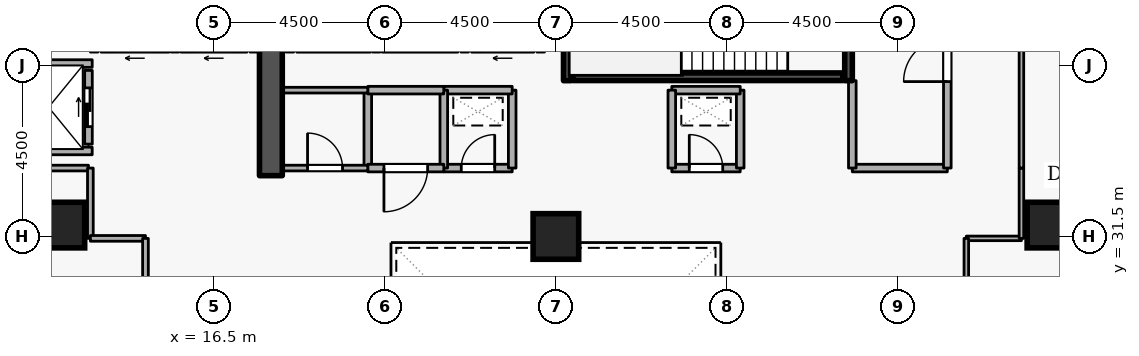
"""IFC4 building model, lengths in metres.
Left out: names, types, materials, properties, quantities, classifications, styles, units other than length and angle.
Written with IfcOpenShell. Run it as: python <this file> out.ifc"""

import sys

from ifc_helpers import new_model, si_unit, direction, frame, frame_2d, origin, origin_2d, place, context, subcontext, project, spatial, rectangle, extrude, element, fill, save


model = new_model("IFC4")
c1 = context("Model", 3, precision=1e-05, world=origin(), true_north=direction((0.0, 1.0)))
c2 = subcontext(c1, "Body", "Model", "MODEL_VIEW")
j1 = project(units=[si_unit("LENGTHUNIT", "METRE"), si_unit("PLANEANGLEUNIT", "RADIAN")], contexts=[c1])
p1 = place(None, origin())
s1 = spatial("IfcSite", under=j1, at=p1, CompositionType="ELEMENT")
p2 = place(p1, origin())
s2 = spatial("IfcBuilding", under=s1, at=p2, CompositionType="ELEMENT")
p3 = place(p2, frame((0.0, 0.0, 98.1)))
s3 = spatial("IfcBuildingStorey", under=s2, at=p3, CompositionType="ELEMENT", Elevation=98.1)
p4 = place(p3, frame((18.0, 33.1, 0.0), z_axis=(0.0, 0.0, 1.0), x_axis=(0.0, 1.0, 0.0)))
e1 = element("IfcWall", 1, at=p4, inside=s3, PredefinedType="SHEAR", context=c2, shape_type="SweptSolid", body=[
    extrude(rectangle(XDim=5.7, YDim=0.6, at=frame_2d((2.85, 0.0))), origin(), (0.0, 0.0, 1.0), 3.6),
])
for number, where, z_axis, x_axis in (
    (2, (12.5, 31.8, 0.0), (0.0, 0.0, 1.0), (1.0, 0.0, 0.0)),
    (3, (38.5, 31.8, 0.0), (0.0, 0.0, 1.0), (1.0, 0.0, 0.0)),
    (4, (25.5, 31.5, 0.0), (0.0, 0.0, 1.0), (1.0, 0.0, 0.0)),
):
    element("IfcColumn", number, at=place(p3, frame(where, z_axis=z_axis, x_axis=x_axis)), inside=s3, PredefinedType="COLUMN", context=c2, shape_type="SweptSolid", body=[
        extrude(rectangle(XDim=1.2, YDim=1.2, at=origin_2d()), origin(), (0.0, 0.0, 1.0), 3.6),
    ])
p5 = place(p3, frame((24.92, 36.45, 0.0), z_axis=(0.0, 0.0, 1.0), x_axis=(-1.0, 0.0, 0.0)))
e5 = element("IfcWall", 5, at=p5, inside=s3, PredefinedType="STANDARD", context=c2, shape_type="SweptSolid", body=[
    extrude(rectangle(XDim=1.64, YDim=0.2, at=frame_2d((0.82, 0.0))), origin(), (0.0, 0.0, 1.0), 3.3),
])
p6 = place(p5, frame((0.31, 0.0, 0.0)))
e6 = element("IfcOpeningElement", 6, at=p6, cuts=e5, PredefinedType="OPENING", context=c2, shape_type="SweptSolid", body=[
    extrude(rectangle(XDim=1.02, YDim=2.06, at=frame_2d((0.51, 1.03))), frame((0.0, 0.11, 0.0), z_axis=(0.0, -1.0, 0.0), x_axis=(1.0, 0.0, 0.0)), (0.0, 0.0, 1.0), 0.22),
])
p7 = place(p3, frame((22.92, 36.45, 0.0), z_axis=(0.0, 0.0, 1.0), x_axis=(-1.0, 0.0, 0.0)))
e7 = element("IfcWall", 7, at=p7, inside=s3, PredefinedType="STANDARD", context=c2, shape_type="SweptSolid", body=[
    extrude(rectangle(XDim=1.99, YDim=0.2, at=frame_2d((0.995, 0.0))), origin(), (0.0, 0.0, 1.0), 3.3),
])
p8 = place(p3, frame((20.62, 36.45, 0.0), z_axis=(0.0, 0.0, 1.0), x_axis=(-1.0, 0.0, 0.0)))
e8 = element("IfcWall", 8, at=p8, inside=s3, PredefinedType="STANDARD", context=c2, shape_type="SweptSolid", body=[
    extrude(rectangle(XDim=1.94, YDim=0.2, at=frame_2d((0.97, 0.0))), origin(), (0.0, 0.0, 1.0), 3.3),
])
p9 = place(p3, frame((17.37, 36.45, 0.0), z_axis=(0.0, 0.0, 1.0), x_axis=(-1.0, 0.0, 0.0)))
e9 = element("IfcWall", 9, at=p9, inside=s3, PredefinedType="STANDARD", context=c2, shape_type="SweptSolid", body=[
    extrude(rectangle(XDim=1.74, YDim=0.2, at=frame_2d((0.87, 0.0))), origin(), (0.0, 0.0, 1.0), 3.3),
])
p10 = place(p9, frame((0.36, 0.0, 0.0)))
e10 = element("IfcOpeningElement", 10, at=p10, cuts=e9, PredefinedType="OPENING", context=c2, shape_type="SweptSolid", body=[
    extrude(rectangle(XDim=1.02, YDim=2.06, at=frame_2d((0.51, 1.03))), frame((0.0, 0.11, 0.0), z_axis=(0.0, -1.0, 0.0), x_axis=(1.0, 0.0, 0.0)), (0.0, 0.0, 1.0), 0.22),
])
p11 = place(p3, frame((15.32, 36.45, 0.0), z_axis=(0.0, 0.0, 1.0), x_axis=(-1.0, 0.0, 0.0)))
e11 = element("IfcWall", 11, at=p11, inside=s3, PredefinedType="STANDARD", context=c2, shape_type="SweptSolid", body=[
    extrude(rectangle(XDim=1.79, YDim=0.2, at=frame_2d((0.895, 0.0))), origin(), (0.0, 0.0, 1.0), 3.3),
])
p12 = place(p11, frame((0.385, 0.0, 0.0)))
e12 = element("IfcOpeningElement", 12, at=p12, cuts=e11, PredefinedType="OPENING", context=c2, shape_type="SweptSolid", body=[
    extrude(rectangle(XDim=1.02, YDim=2.06, at=frame_2d((0.51, 1.03))), frame((0.0, 0.11, 0.0), z_axis=(0.0, -1.0, 0.0), x_axis=(1.0, 0.0, 0.0)), (0.0, 0.0, 1.0), 0.22),
])
p13 = place(p3, frame((13.2, 33.93, 0.0), z_axis=(0.0, 0.0, 1.0), x_axis=(0.0, 1.0, 0.0)))
e13 = element("IfcWall", 13, at=p13, inside=s3, PredefinedType="STANDARD", context=c2, shape_type="SweptSolid", body=[
    extrude(rectangle(XDim=1.94, YDim=0.2, at=frame_2d((0.97, 0.0))), origin(), (0.0, 0.0, 1.0), 3.3),
])
p14 = place(p13, frame((0.46, 0.0, 0.0)))
e14 = element("IfcOpeningElement", 14, at=p14, cuts=e13, PredefinedType="OPENING", context=c2, shape_type="SweptSolid", body=[
    extrude(rectangle(XDim=1.02, YDim=2.06, at=frame_2d((0.51, 1.03))), frame((0.0, 0.11, 0.0), z_axis=(0.0, -1.0, 0.0), x_axis=(1.0, 0.0, 0.0)), (0.0, 0.0, 1.0), 0.22),
])
for number, where, z_axis, x_axis in (
    (15, (11.002, 36.05, 0.0), (0.0, 0.0, 1.0), (1.0, 0.0, 0.0)),
    (16, (11.002, 33.75, 0.0), (0.0, 0.0, 1.0), (1.0, 0.0, 0.0)),
):
    element("IfcWall", number, at=place(p3, frame(where, z_axis=z_axis, x_axis=x_axis)), inside=s3, PredefinedType="STANDARD", context=c2, shape_type="SweptSolid", body=[
        extrude(rectangle(XDim=2.296, YDim=0.2, at=frame_2d((1.148, 0.0))), origin(), (0.0, 0.0, 1.0), 3.3),
    ])
p15 = place(p3, frame((33.2, 38.95, 0.0), z_axis=(0.0, 0.0, 1.0), x_axis=(0.0, -1.0, 0.0)))
e17 = element("IfcWall", 17, at=p15, inside=s3, PredefinedType="SHEAR", context=c2, shape_type="SweptSolid", body=[
    extrude(rectangle(XDim=3.35, YDim=0.2, at=frame_2d((1.675, 0.0))), origin(), (0.0, 0.0, 1.0), 3.6),
])
p16 = place(p15, frame((1.125, 0.0, 0.0)))
e18 = element("IfcOpeningElement", 18, at=p16, cuts=e17, PredefinedType="OPENING", context=c2, shape_type="SweptSolid", body=[
    extrude(rectangle(XDim=1.1, YDim=2.1, at=frame_2d((0.55, 1.05))), frame((0.0, 0.11, 0.0), z_axis=(0.0, -1.0, 0.0), x_axis=(1.0, 0.0, 0.0)), (0.0, 0.0, 1.0), 0.22),
])
p17 = place(p3, frame((25.8, 35.6, 0.0), z_axis=(0.0, 0.0, 1.0), x_axis=(0.0, 1.0, 0.0)))
e19 = element("IfcWall", 19, at=p17, inside=s3, PredefinedType="SHEAR", context=c2, shape_type="SweptSolid", body=[
    extrude(rectangle(XDim=3.35, YDim=0.2, at=frame_2d((1.675, 0.0))), origin(), (0.0, 0.0, 1.0), 3.6),
])
p18 = place(p3, frame((25.95, 35.703, 0.0), z_axis=(0.0, 0.0, 1.0), x_axis=(1.0, 0.0, 0.0)))
e20 = element("IfcWall", 20, at=p18, inside=s3, PredefinedType="SHEAR", context=c2, shape_type="SweptSolid", body=[
    extrude(rectangle(XDim=7.1, YDim=0.2, at=frame_2d((3.55, 0.0))), origin(), (0.0, 0.0, 1.0), 3.6),
])
p19 = place(p3, frame((33.3, 33.3, 0.0), z_axis=(0.0, 0.0, 1.0), x_axis=(1.0, 0.0, 0.0)))
e21 = element("IfcWall", 21, at=p19, inside=s3, PredefinedType="STANDARD", context=c2, shape_type="SweptSolid", body=[
    extrude(rectangle(XDim=2.5, YDim=0.2, at=frame_2d((1.25, 0.0))), origin(), (0.0, 0.0, 1.0), 3.3),
])
p20 = place(p3, frame((35.8, 33.3, 0.0), z_axis=(0.0, 0.0, 1.0), x_axis=(0.0, 1.0, 0.0)))
e22 = element("IfcWall", 22, at=p20, inside=s3, PredefinedType="STANDARD", context=c2, shape_type="SweptSolid", body=[
    extrude(rectangle(XDim=5.7, YDim=0.2, at=frame_2d((2.85, 0.0))), origin(), (0.0, 0.0, 1.0), 3.3),
])
p21 = place(p20, frame((2.275, 0.0, 0.0)))
e23 = element("IfcOpeningElement", 23, at=p21, cuts=e22, PredefinedType="OPENING", context=c2, shape_type="SweptSolid", body=[
    extrude(rectangle(XDim=1.15, YDim=2.1, at=frame_2d((0.575, 1.05))), frame((0.0, 0.11, 0.0), z_axis=(0.0, -1.0, 0.0), x_axis=(1.0, 0.0, 0.0)), (0.0, 0.0, 1.0), 0.22),
])
p22 = place(p3, frame((33.3, 35.6, 0.0), z_axis=(0.0, 0.0, 1.0), x_axis=(0.0, -1.0, 0.0)))
e24 = element("IfcWall", 24, at=p22, inside=s3, PredefinedType="STANDARD", context=c2, shape_type="SweptSolid", body=[
    extrude(rectangle(XDim=2.3, YDim=0.2, at=frame_2d((1.15, 0.0))), origin(), (0.0, 0.0, 1.0), 2.505),
])
p23 = place(p3, frame((22.55, 33.3, 0.0), z_axis=(0.0, 0.0, 1.0), x_axis=(1.0, 0.0, 0.0)))
e25 = element("IfcWall", 25, at=p23, inside=s3, PredefinedType="STANDARD", context=c2, shape_type="SweptSolid", body=[
    extrude(rectangle(XDim=1.8, YDim=0.2, at=frame_2d((0.9, 0.0))), origin(), (0.0, 0.0, 1.0), 3.3),
])
p24 = place(p23, frame((0.46, 0.0, 0.0)))
e26 = element("IfcOpeningElement", 26, at=p24, cuts=e25, PredefinedType="OPENING", context=c2, shape_type="SweptSolid", body=[
    extrude(rectangle(XDim=0.88, YDim=2.04, at=frame_2d((0.44, 1.02))), frame((0.0, 0.11, 0.0), z_axis=(0.0, -1.0, 0.0), x_axis=(1.0, 0.0, 0.0)), (0.0, 0.0, 1.0), 0.22),
])
p25 = place(p3, frame((24.35, 33.3, 0.0), z_axis=(0.0, 0.0, 1.0), x_axis=(0.0, 1.0, 0.0)))
e27 = element("IfcWall", 27, at=p25, inside=s3, PredefinedType="STANDARD", context=c2, shape_type="SweptSolid", body=[
    extrude(rectangle(XDim=2.05, YDim=0.2, at=frame_2d((1.025, 0.0))), origin(), (0.0, 0.0, 1.0), 3.3),
])
p26 = place(p3, frame((24.35, 35.35, 0.0), z_axis=(0.0, 0.0, 1.0), x_axis=(-1.0, 0.0, 0.0)))
e28 = element("IfcWall", 28, at=p26, inside=s3, PredefinedType="STANDARD", context=c2, shape_type="SweptSolid", body=[
    extrude(rectangle(XDim=1.8, YDim=0.2, at=frame_2d((0.9, 0.0))), origin(), (0.0, 0.0, 1.0), 3.3),
])
p27 = place(p3, frame((22.55, 35.35, 0.0), z_axis=(0.0, 0.0, 1.0), x_axis=(0.0, -1.0, 0.0)))
e29 = element("IfcWall", 29, at=p27, inside=s3, PredefinedType="STANDARD", context=c2, shape_type="SweptSolid", body=[
    extrude(rectangle(XDim=2.05, YDim=0.2, at=frame_2d((1.025, 0.0))), origin(), (0.0, 0.0, 1.0), 3.3),
])
p28 = place(p3, frame((28.55, 33.3, 0.0), z_axis=(0.0, 0.0, 1.0), x_axis=(1.0, 0.0, 0.0)))
e30 = element("IfcWall", 30, at=p28, inside=s3, PredefinedType="STANDARD", context=c2, shape_type="SweptSolid", body=[
    extrude(rectangle(XDim=1.8, YDim=0.2, at=frame_2d((0.9, 0.0))), origin(), (0.0, 0.0, 1.0), 3.3),
])
p29 = place(p28, frame((0.46, 0.0, 0.0)))
e31 = element("IfcOpeningElement", 31, at=p29, cuts=e30, PredefinedType="OPENING", context=c2, shape_type="SweptSolid", body=[
    extrude(rectangle(XDim=0.88, YDim=2.04, at=frame_2d((0.44, 1.02))), frame((0.0, 0.11, 0.0), z_axis=(0.0, -1.0, 0.0), x_axis=(1.0, 0.0, 0.0)), (0.0, 0.0, 1.0), 0.22),
])
p30 = place(p3, frame((30.35, 33.3, 0.0), z_axis=(0.0, 0.0, 1.0), x_axis=(0.0, 1.0, 0.0)))
e32 = element("IfcWall", 32, at=p30, inside=s3, PredefinedType="STANDARD", context=c2, shape_type="SweptSolid", body=[
    extrude(rectangle(XDim=2.05, YDim=0.2, at=frame_2d((1.025, 0.0))), origin(), (0.0, 0.0, 1.0), 3.3),
])
p31 = place(p3, frame((30.35, 35.35, 0.0), z_axis=(0.0, 0.0, 1.0), x_axis=(-1.0, 0.0, 0.0)))
e33 = element("IfcWall", 33, at=p31, inside=s3, PredefinedType="STANDARD", context=c2, shape_type="SweptSolid", body=[
    extrude(rectangle(XDim=1.8, YDim=0.2, at=frame_2d((0.9, 0.0))), origin(), (0.0, 0.0, 1.0), 3.3),
])
for number, where, z_axis, x_axis in (
    (34, (28.55, 35.35, 0.0), (0.0, 0.0, 1.0), (0.0, -1.0, 0.0)),
    (35, (20.55, 33.3, 0.0), (0.0, 0.0, 1.0), (0.0, 1.0, 0.0)),
):
    element("IfcWall", number, at=place(p3, frame(where, z_axis=z_axis, x_axis=x_axis)), inside=s3, PredefinedType="STANDARD", context=c2, shape_type="SweptSolid", body=[
        extrude(rectangle(XDim=2.05, YDim=0.2, at=frame_2d((1.025, 0.0))), origin(), (0.0, 0.0, 1.0), 3.3),
    ])
p32 = place(p3, frame((20.55, 35.35, 0.0), z_axis=(0.0, 0.0, 1.0), x_axis=(1.0, 0.0, 0.0)))
e36 = element("IfcWall", 36, at=p32, inside=s3, PredefinedType="STANDARD", context=c2, shape_type="SweptSolid", body=[
    extrude(rectangle(XDim=2.0, YDim=0.2, at=frame_2d((1.0, 0.0))), origin(), (0.0, 0.0, 1.0), 3.3),
])
p33 = place(p3, frame((22.55, 33.3, 0.0), z_axis=(0.0, 0.0, 1.0), x_axis=(-1.0, 0.0, 0.0)))
e37 = element("IfcWall", 37, at=p33, inside=s3, PredefinedType="STANDARD", context=c2, shape_type="SweptSolid", body=[
    extrude(rectangle(XDim=2.0, YDim=0.2, at=frame_2d((1.0, 0.0))), origin(), (0.0, 0.0, 1.0), 3.3),
])
p34 = place(p33, frame((0.425, 0.0, 0.0)))
e38 = element("IfcOpeningElement", 38, at=p34, cuts=e37, PredefinedType="OPENING", context=c2, shape_type="SweptSolid", body=[
    extrude(rectangle(XDim=1.15, YDim=2.1, at=frame_2d((0.575, 1.05))), frame((0.0, 0.11, 0.0), z_axis=(0.0, -1.0, 0.0), x_axis=(1.0, 0.0, 0.0)), (0.0, 0.0, 1.0), 0.22),
])
p35 = place(p3, frame((18.3, 33.3, 0.0), z_axis=(0.0, 0.0, 1.0), x_axis=(1.0, 0.0, 0.0)))
e39 = element("IfcWall", 39, at=p35, inside=s3, PredefinedType="PARTITIONING", context=c2, shape_type="SweptSolid", body=[
    extrude(rectangle(XDim=2.25, YDim=0.15, at=frame_2d((1.125, 0.0))), origin(), (0.0, 0.0, 1.0), 3.3),
])
p36 = place(p35, frame((0.665, 0.0, 0.0)))
e40 = element("IfcOpeningElement", 40, at=p36, cuts=e39, PredefinedType="OPENING", context=c2, shape_type="SweptSolid", body=[
    extrude(rectangle(XDim=0.92, YDim=2.08, at=frame_2d((0.46, 1.04))), frame((0.0, 0.085, 0.0), z_axis=(0.0, -1.0, 0.0), x_axis=(1.0, 0.0, 0.0)), (0.0, 0.0, 1.0), 0.17),
])
p37 = place(p3, frame((20.55, 35.35, 0.0), z_axis=(0.0, 0.0, 1.0), x_axis=(-1.0, 0.0, 0.0)))
e41 = element("IfcWall", 41, at=p37, inside=s3, PredefinedType="PARTITIONING", context=c2, shape_type="SweptSolid", body=[
    extrude(rectangle(XDim=2.25, YDim=0.15, at=frame_2d((1.125, 0.0))), origin(), (0.0, 0.0, 1.0), 3.3),
])
p38 = place(p3, frame((10.9, 33.3, 0.0), z_axis=(0.0, 0.0, 1.0), x_axis=(1.0, 0.0, 0.0)))
e42 = element("IfcWall", 42, at=p38, inside=s3, PredefinedType="PARTITIONING", context=c2, shape_type="SweptSolid", body=[
    extrude(rectangle(XDim=2.3, YDim=0.15, at=frame_2d((1.15, 0.0))), origin(), (0.0, 0.0, 1.0), 3.3),
])
p39 = place(p3, frame((13.25, 33.3, 0.0), z_axis=(0.0, 0.0, 1.0), x_axis=(0.0, -1.0, 0.0)))
e43 = element("IfcWall", 43, at=p39, inside=s3, PredefinedType="PARTITIONING", context=c2, shape_type="SweptSolid", body=[
    extrude(rectangle(XDim=1.85, YDim=0.15, at=frame_2d((0.925, 0.0))), origin(), (0.0, 0.0, 1.0), 3.3),
])
p40 = place(p3, frame((13.25, 31.45, 0.0), z_axis=(0.0, 0.0, 1.0), x_axis=(1.0, 0.0, 0.0)))
e44 = element("IfcWall", 44, at=p40, inside=s3, PredefinedType="PARTITIONING", context=c2, shape_type="SweptSolid", body=[
    extrude(rectangle(XDim=1.45, YDim=0.15, at=frame_2d((0.725, 0.0))), origin(), (0.0, 0.0, 1.0), 3.3),
])
p41 = place(p3, frame((14.7, 31.45, 0.0), z_axis=(0.0, 0.0, 1.0), x_axis=(0.0, -1.0, 0.0)))
e45 = element("IfcWall", 45, at=p41, inside=s3, PredefinedType="PARTITIONING", context=c2, shape_type="SweptSolid", body=[
    extrude(rectangle(XDim=4.45, YDim=0.15, at=frame_2d((2.225, 0.0))), origin(), (0.0, 0.0, 1.0), 3.3),
])
p42 = place(p41, frame((1.575, 0.0, 0.0)))
e46 = element("IfcOpeningElement", 46, at=p42, cuts=e45, PredefinedType="OPENING", context=c2, shape_type="SweptSolid", body=[
    extrude(rectangle(XDim=1.3, YDim=2.12, at=frame_2d((0.65, 1.06))), frame((0.0, 0.085, 0.0), z_axis=(0.0, -1.0, 0.0), x_axis=(1.0, 0.0, 0.0)), (0.0, 0.0, 1.0), 0.17),
])
p43 = place(p3, frame((36.3, 31.45, 0.0), z_axis=(0.0, 0.0, 1.0), x_axis=(1.0, 0.0, 0.0)))
e47 = element("IfcWall", 47, at=p43, inside=s3, PredefinedType="PARTITIONING", context=c2, shape_type="SweptSolid", body=[
    extrude(rectangle(XDim=1.45, YDim=0.12, at=frame_2d((0.725, 0.0))), origin(), (0.0, 0.0, 1.0), 3.3),
])
p44 = place(p3, frame((37.75, 31.45, 0.0), z_axis=(0.0, 0.0, 1.0), x_axis=(0.0, 1.0, 0.0)))
e48 = element("IfcWall", 48, at=p44, inside=s3, PredefinedType="PARTITIONING", context=c2, shape_type="SweptSolid", body=[
    extrude(rectangle(XDim=1.85, YDim=0.12, at=frame_2d((0.925, 0.0))), origin(), (0.0, 0.0, 1.0), 3.3),
])
p45 = place(p3, frame((37.75, 33.3, 0.0), z_axis=(0.0, 0.0, 1.0), x_axis=(0.0, 1.0, 0.0)))
e49 = element("IfcWall", 49, at=p45, inside=s3, PredefinedType="PARTITIONING", context=c2, shape_type="SweptSolid", body=[
    extrude(rectangle(XDim=9.35, YDim=0.12, at=frame_2d((4.675, 0.0))), origin(), (0.0, 0.0, 1.0), 3.3),
])
p46 = place(p45, frame((4.15, 0.0, 0.0)))
e50 = element("IfcOpeningElement", 50, at=p46, cuts=e49, PredefinedType="OPENING", context=c2, shape_type="SweptSolid", body=[
    extrude(rectangle(XDim=1.05, YDim=2.1, at=frame_2d((0.525, 1.05))), frame((0.0, 0.07, 0.0), z_axis=(0.0, -1.0, 0.0), x_axis=(1.0, 0.0, 0.0)), (0.0, 0.0, 1.0), 0.14),
])
p47 = place(p3, frame((36.3, 27.0, 0.0), z_axis=(0.0, 0.0, 1.0), x_axis=(0.0, 1.0, 0.0)))
e51 = element("IfcWall", 51, at=p47, inside=s3, PredefinedType="PARTITIONING", context=c2, shape_type="SweptSolid", body=[
    extrude(rectangle(XDim=4.45, YDim=0.12, at=frame_2d((2.225, 0.0))), origin(), (0.0, 0.0, 1.0), 3.3),
])
p48 = place(p14, origin())
e52 = element("IfcDoor", 52, at=p48, inside=s3, OperationType="SLIDING_TO_LEFT", PredefinedType="DOOR", context=c2, shape_type="SweptSolid", body=[
    extrude(rectangle(XDim=1.02, YDim=2.06, at=frame_2d((0.51, 1.03))), frame((0.0, 0.025, 0.0), z_axis=(0.0, -1.0, 0.0), x_axis=(1.0, 0.0, 0.0)), (0.0, 0.0, 1.0), 0.05),
])
fill(e14, e52)
p49 = place(p21, origin())
e53 = element("IfcDoor", 53, at=p49, inside=s3, OperationType="SINGLE_SWING_LEFT", PredefinedType="DOOR", context=c2, shape_type="SweptSolid", body=[
    extrude(rectangle(XDim=1.15, YDim=2.1, at=frame_2d((0.575, 1.05))), frame((0.0, 0.025, 0.0), z_axis=(0.0, -1.0, 0.0), x_axis=(1.0, 0.0, 0.0)), (0.0, 0.0, 1.0), 0.05),
])
fill(e23, e53)
p50 = place(p24, origin())
e54 = element("IfcDoor", 54, at=p50, inside=s3, OperationType="SINGLE_SWING_RIGHT", PredefinedType="DOOR", context=c2, shape_type="SweptSolid", body=[
    extrude(rectangle(XDim=0.88, YDim=2.04, at=frame_2d((0.44, 1.02))), frame((0.0, 0.025, 0.0), z_axis=(0.0, -1.0, 0.0), x_axis=(1.0, 0.0, 0.0)), (0.0, 0.0, 1.0), 0.05),
])
fill(e26, e54)
p51 = place(p29, origin())
e55 = element("IfcDoor", 55, at=p51, inside=s3, OperationType="SINGLE_SWING_LEFT", PredefinedType="DOOR", context=c2, shape_type="SweptSolid", body=[
    extrude(rectangle(XDim=0.88, YDim=2.04, at=frame_2d((0.44, 1.02))), frame((0.0, 0.025, 0.0), z_axis=(0.0, -1.0, 0.0), x_axis=(1.0, 0.0, 0.0)), (0.0, 0.0, 1.0), 0.05),
])
fill(e31, e55)
p52 = place(p36, origin())
e56 = element("IfcDoor", 56, at=p52, inside=s3, OperationType="SINGLE_SWING_LEFT", PredefinedType="DOOR", context=c2, shape_type="SweptSolid", body=[
    extrude(rectangle(XDim=0.92, YDim=2.08, at=frame_2d((0.46, 1.04))), frame((0.0, 0.025, 0.0), z_axis=(0.0, -1.0, 0.0), x_axis=(1.0, 0.0, 0.0)), (0.0, 0.0, 1.0), 0.05),
])
fill(e40, e56)
p53 = place(p34, origin())
e57 = element("IfcDoor", 57, at=p53, inside=s3, OperationType="SINGLE_SWING_RIGHT", PredefinedType="DOOR", context=c2, shape_type="SweptSolid", body=[
    extrude(rectangle(XDim=1.15, YDim=2.1, at=frame_2d((0.575, 1.05))), frame((0.0, 0.025, 0.0), z_axis=(0.0, -1.0, 0.0), x_axis=(1.0, 0.0, 0.0)), (0.0, 0.0, 1.0), 0.05),
])
fill(e38, e57)
save(model, sys.argv[1])
